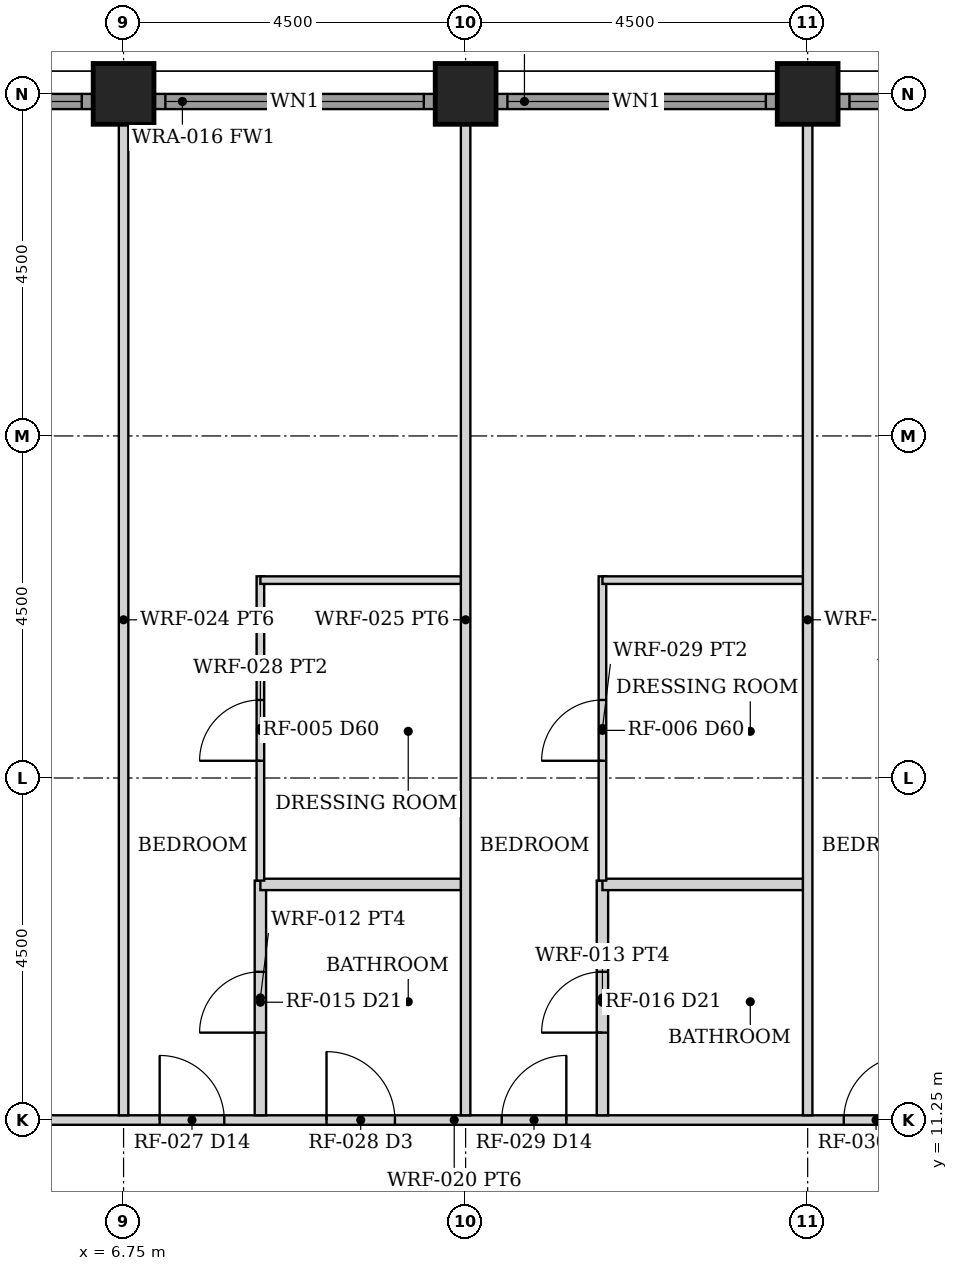
"""IFC4 building model, lengths in metres.
Left out: names, types, materials, properties, quantities, classifications, styles, units other than length and angle.
Written with IfcOpenShell. Run it as: python <this file> out.ifc"""

import sys

from ifc_helpers import new_model, si_unit, direction, frame, frame_2d, origin, origin_2d, place, context, subcontext, project, spatial, rectangle, hollow_rectangle, extrude, element, fill, save


model = new_model("IFC4")
c1 = context("Model", 3, precision=1e-05, world=origin(), true_north=direction((0.0, 1.0)))
c2 = subcontext(c1, "Body", "Model", "MODEL_VIEW")
j1 = project(units=[si_unit("LENGTHUNIT", "METRE"), si_unit("PLANEANGLEUNIT", "RADIAN")], contexts=[c1])
p1 = place(None, origin())
s1 = spatial("IfcSite", under=j1, at=p1, CompositionType="ELEMENT")
p2 = place(p1, origin())
s2 = spatial("IfcBuilding", under=s1, at=p2, CompositionType="ELEMENT")
p3 = place(p2, frame((0.0, 0.0, 79.0)))
s3 = spatial("IfcBuildingStorey", under=s2, at=p3, CompositionType="ELEMENT", Elevation=79.0)
for number, where, z_axis, x_axis in (
    (1, (6.75, 24.75, 0.0), (0.0, 0.0, 1.0), (0.0, 1.0, 0.0)),
    (2, (11.25, 24.75, 0.0), (0.0, 0.0, 1.0), (0.0, 1.0, 0.0)),
    (3, (15.75, 24.75, 0.0), (0.0, 0.0, 1.0), (0.0, 1.0, 0.0)),
):
    element("IfcColumn", number, at=place(p3, frame(where, z_axis=z_axis, x_axis=x_axis)), inside=s3, PredefinedType="COLUMN", context=c2, shape_type="SweptSolid", body=[
        extrude(hollow_rectangle(XDim=0.8, YDim=0.8, WallThickness=0.06, at=origin_2d()), origin(), (0.0, 0.0, 1.0), 3.5),
    ])
p4 = place(p3, frame((2.655, 24.65, 0.0), z_axis=(0.0, 0.0, 1.0), x_axis=(1.0, 0.0, 0.0)))
e4 = element("IfcWall", 4, at=p4, inside=s3, PredefinedType="SOLIDWALL", context=c2, shape_type="SweptSolid", body=[
    extrude(rectangle(XDim=3.69, YDim=0.2, at=frame_2d((1.845, 0.0))), origin(), (0.0, 0.0, 1.0), 2.379),
])
p5 = place(p4, frame((0.145, 0.0, 0.3)))
e5 = element("IfcOpeningElement", 5, at=p5, cuts=e4, PredefinedType="OPENING", context=c2, shape_type="SweptSolid", body=[
    extrude(rectangle(XDim=3.4, YDim=1.929, at=frame_2d((1.7, 0.964))), frame((0.0, 0.11, 0.0), z_axis=(0.0, -1.0, 0.0), x_axis=(1.0, 0.0, 0.0)), (0.0, 0.0, 1.0), 0.22),
])
p6 = place(p3, frame((7.155, 24.65, 0.0), z_axis=(0.0, 0.0, 1.0), x_axis=(1.0, 0.0, 0.0)))
e6 = element("IfcWall", 6, at=p6, inside=s3, PredefinedType="SOLIDWALL", context=c2, shape_type="SweptSolid", body=[
    extrude(rectangle(XDim=3.69, YDim=0.2, at=frame_2d((1.845, 0.0))), origin(), (0.0, 0.0, 1.0), 2.379),
])
p7 = place(p6, frame((0.145, 0.0, 0.3)))
e7 = element("IfcOpeningElement", 7, at=p7, cuts=e6, PredefinedType="OPENING", context=c2, shape_type="SweptSolid", body=[
    extrude(rectangle(XDim=3.4, YDim=1.929, at=frame_2d((1.7, 0.964))), frame((0.0, 0.11, 0.0), z_axis=(0.0, -1.0, 0.0), x_axis=(1.0, 0.0, 0.0)), (0.0, 0.0, 1.0), 0.22),
])
p8 = place(p3, frame((11.655, 24.65, 0.0), z_axis=(0.0, 0.0, 1.0), x_axis=(1.0, 0.0, 0.0)))
e8 = element("IfcWall", 8, at=p8, inside=s3, PredefinedType="SOLIDWALL", context=c2, shape_type="SweptSolid", body=[
    extrude(rectangle(XDim=3.69, YDim=0.2, at=frame_2d((1.845, 0.0))), origin(), (0.0, 0.0, 1.0), 2.379),
])
p9 = place(p8, frame((0.145, 0.0, 0.3)))
e9 = element("IfcOpeningElement", 9, at=p9, cuts=e8, PredefinedType="OPENING", context=c2, shape_type="SweptSolid", body=[
    extrude(rectangle(XDim=3.4, YDim=1.929, at=frame_2d((1.7, 0.964))), frame((0.0, 0.11, 0.0), z_axis=(0.0, -1.0, 0.0), x_axis=(1.0, 0.0, 0.0)), (0.0, 0.0, 1.0), 0.22),
])
p10 = place(p3, frame((16.155, 24.65, 0.0), z_axis=(0.0, 0.0, 1.0), x_axis=(1.0, 0.0, 0.0)))
e10 = element("IfcWall", 10, at=p10, inside=s3, PredefinedType="SOLIDWALL", context=c2, shape_type="SweptSolid", body=[
    extrude(rectangle(XDim=3.69, YDim=0.2, at=frame_2d((1.845, 0.0))), origin(), (0.0, 0.0, 1.0), 2.379),
])
p11 = place(p10, frame((0.145, 0.0, 0.3)))
e11 = element("IfcOpeningElement", 11, at=p11, cuts=e10, PredefinedType="OPENING", context=c2, shape_type="SweptSolid", body=[
    extrude(rectangle(XDim=3.4, YDim=1.929, at=frame_2d((1.7, 0.964))), frame((0.0, 0.11, 0.0), z_axis=(0.0, -1.0, 0.0), x_axis=(1.0, 0.0, 0.0)), (0.0, 0.0, 1.0), 0.22),
])
p12 = place(p3, frame((-2.15, 11.25, 0.0), z_axis=(0.0, 0.0, 1.0), x_axis=(1.0, 0.0, 0.0)))
e12 = element("IfcWall", 12, at=p12, inside=s3, PredefinedType="PARTITIONING", context=c2, shape_type="SweptSolid", body=[
    extrude(rectangle(XDim=26.5, YDim=0.125, at=frame_2d((13.25, 0.0))), origin(), (0.0, 0.0, 1.0), 2.373),
])
p13 = place(p12, frame((0.85, 0.0, 0.0)))
e13 = element("IfcOpeningElement", 13, at=p13, cuts=e12, PredefinedType="OPENING", context=c2, shape_type="SweptSolid", body=[
    extrude(rectangle(XDim=0.9, YDim=2.1, at=frame_2d((0.45, 1.05))), frame((0.0, 0.073, 0.0), z_axis=(0.0, -1.0, 0.0), x_axis=(1.0, 0.0, 0.0)), (0.0, 0.0, 1.0), 0.145),
])
p14 = place(p12, frame((5.95, 0.0, 0.0)))
e14 = element("IfcOpeningElement", 14, at=p14, cuts=e12, PredefinedType="OPENING", context=c2, shape_type="SweptSolid", body=[
    extrude(rectangle(XDim=1.4, YDim=2.1, at=frame_2d((0.7, 1.05))), frame((0.0, 0.073, 0.0), z_axis=(0.0, -1.0, 0.0), x_axis=(1.0, 0.0, 0.0)), (0.0, 0.0, 1.0), 0.145),
])
p15 = place(p12, frame((9.375, 0.0, 0.0)))
e15 = element("IfcOpeningElement", 15, at=p15, cuts=e12, PredefinedType="OPENING", context=c2, shape_type="SweptSolid", body=[
    extrude(rectangle(XDim=0.85, YDim=2.1, at=frame_2d((0.425, 1.05))), frame((0.0, 0.073, 0.0), z_axis=(0.0, -1.0, 0.0), x_axis=(1.0, 0.0, 0.0)), (0.0, 0.0, 1.0), 0.145),
])
p16 = place(p12, frame((11.57, 0.0, 0.0)))
e16 = element("IfcOpeningElement", 16, at=p16, cuts=e12, PredefinedType="OPENING", context=c2, shape_type="SweptSolid", body=[
    extrude(rectangle(XDim=0.9, YDim=2.1, at=frame_2d((0.45, 1.05))), frame((0.0, 0.073, 0.0), z_axis=(0.0, -1.0, 0.0), x_axis=(1.0, 0.0, 0.0)), (0.0, 0.0, 1.0), 0.145),
])
p17 = place(p12, frame((13.875, 0.0, 0.0)))
e17 = element("IfcOpeningElement", 17, at=p17, cuts=e12, PredefinedType="OPENING", context=c2, shape_type="SweptSolid", body=[
    extrude(rectangle(XDim=0.85, YDim=2.1, at=frame_2d((0.425, 1.05))), frame((0.0, 0.073, 0.0), z_axis=(0.0, -1.0, 0.0), x_axis=(1.0, 0.0, 0.0)), (0.0, 0.0, 1.0), 0.145),
])
p18 = place(p12, frame((18.375, 0.0, 0.0)))
e18 = element("IfcOpeningElement", 18, at=p18, cuts=e12, PredefinedType="OPENING", context=c2, shape_type="SweptSolid", body=[
    extrude(rectangle(XDim=0.85, YDim=2.1, at=frame_2d((0.425, 1.05))), frame((0.0, 0.073, 0.0), z_axis=(0.0, -1.0, 0.0), x_axis=(1.0, 0.0, 0.0)), (0.0, 0.0, 1.0), 0.145),
])
p19 = place(p12, frame((22.875, 0.0, 0.0)))
e19 = element("IfcOpeningElement", 19, at=p19, cuts=e12, PredefinedType="OPENING", context=c2, shape_type="SweptSolid", body=[
    extrude(rectangle(XDim=0.85, YDim=2.1, at=frame_2d((0.425, 1.05))), frame((0.0, 0.073, 0.0), z_axis=(0.0, -1.0, 0.0), x_axis=(1.0, 0.0, 0.0)), (0.0, 0.0, 1.0), 0.145),
])
p20 = place(p3, frame((6.75, 11.312, 0.0), z_axis=(0.0, 0.0, 1.0), x_axis=(0.0, 1.0, 0.0)))
e20 = element("IfcWall", 20, at=p20, inside=s3, PredefinedType="PARTITIONING", context=c2, shape_type="SweptSolid", body=[
    extrude(rectangle(XDim=13.038, YDim=0.125, at=frame_2d((6.519, 0.0))), origin(), (0.0, 0.0, 1.0), 2.373),
])
p21 = place(p3, frame((8.55, 11.312, 0.0), z_axis=(0.0, 0.0, 1.0), x_axis=(0.0, 1.0, 0.0)))
e21 = element("IfcWall", 21, at=p21, inside=s3, PredefinedType="PARTITIONING", context=c2, shape_type="SweptSolid", body=[
    extrude(rectangle(XDim=3.087, YDim=0.15, at=frame_2d((1.544, 0.0))), origin(), (0.0, 0.0, 1.0), 2.373),
])
p22 = place(p21, frame((1.087, 0.0, 0.0)))
e22 = element("IfcOpeningElement", 22, at=p22, cuts=e21, PredefinedType="OPENING", context=c2, shape_type="SweptSolid", body=[
    extrude(rectangle(XDim=0.8, YDim=2.1, at=frame_2d((0.4, 1.05))), frame((0.0, 0.085, 0.0), z_axis=(0.0, -1.0, 0.0), x_axis=(1.0, 0.0, 0.0)), (0.0, 0.0, 1.0), 0.17),
])
p23 = place(p3, frame((8.55, 14.35, 0.0), z_axis=(0.0, 0.0, 1.0), x_axis=(1.0, 0.0, 0.0)))
e23 = element("IfcWall", 23, at=p23, inside=s3, PredefinedType="PARTITIONING", context=c2, shape_type="SweptSolid", body=[
    extrude(rectangle(XDim=2.64, YDim=0.15, at=frame_2d((1.32, 0.0))), origin(), (0.0, 0.0, 1.0), 2.373),
])
p24 = place(p3, frame((8.55, 14.4, 0.0), z_axis=(0.0, 0.0, 1.0), x_axis=(0.0, 1.0, 0.0)))
e24 = element("IfcWall", 24, at=p24, inside=s3, PredefinedType="PARTITIONING", context=c2, shape_type="SweptSolid", body=[
    extrude(rectangle(XDim=4.003, YDim=0.1, at=frame_2d((2.001, 0.0))), origin(), (0.0, 0.0, 1.0), 2.373),
])
p25 = place(p24, frame((1.576, 0.0, 0.0)))
e25 = element("IfcOpeningElement", 25, at=p25, cuts=e24, PredefinedType="OPENING", context=c2, shape_type="SweptSolid", body=[
    extrude(rectangle(XDim=0.8, YDim=2.1, at=frame_2d((0.4, 1.05))), frame((0.0, 0.06, 0.0), z_axis=(0.0, -1.0, 0.0), x_axis=(1.0, 0.0, 0.0)), (0.0, 0.0, 1.0), 0.12),
])
p26 = place(p3, frame((8.55, 18.353, 0.0), z_axis=(0.0, 0.0, 1.0), x_axis=(1.0, 0.0, 0.0)))
e26 = element("IfcWall", 26, at=p26, inside=s3, PredefinedType="PARTITIONING", context=c2, shape_type="SweptSolid", body=[
    extrude(rectangle(XDim=2.64, YDim=0.1, at=frame_2d((1.32, 0.0))), origin(), (0.0, 0.0, 1.0), 2.373),
])
p27 = place(p3, frame((11.25, 11.312, 0.0), z_axis=(0.0, 0.0, 1.0), x_axis=(0.0, 1.0, 0.0)))
e27 = element("IfcWall", 27, at=p27, inside=s3, PredefinedType="PARTITIONING", context=c2, shape_type="SweptSolid", body=[
    extrude(rectangle(XDim=13.038, YDim=0.125, at=frame_2d((6.519, 0.0))), origin(), (0.0, 0.0, 1.0), 2.373),
])
p28 = place(p3, frame((13.05, 11.312, 0.0), z_axis=(0.0, 0.0, 1.0), x_axis=(0.0, 1.0, 0.0)))
e28 = element("IfcWall", 28, at=p28, inside=s3, PredefinedType="PARTITIONING", context=c2, shape_type="SweptSolid", body=[
    extrude(rectangle(XDim=3.087, YDim=0.15, at=frame_2d((1.544, 0.0))), origin(), (0.0, 0.0, 1.0), 2.373),
])
p29 = place(p28, frame((1.087, 0.0, 0.0)))
e29 = element("IfcOpeningElement", 29, at=p29, cuts=e28, PredefinedType="OPENING", context=c2, shape_type="SweptSolid", body=[
    extrude(rectangle(XDim=0.8, YDim=2.1, at=frame_2d((0.4, 1.05))), frame((0.0, 0.085, 0.0), z_axis=(0.0, -1.0, 0.0), x_axis=(1.0, 0.0, 0.0)), (0.0, 0.0, 1.0), 0.17),
])
p30 = place(p3, frame((13.05, 14.35, 0.0), z_axis=(0.0, 0.0, 1.0), x_axis=(1.0, 0.0, 0.0)))
e30 = element("IfcWall", 30, at=p30, inside=s3, PredefinedType="PARTITIONING", context=c2, shape_type="SweptSolid", body=[
    extrude(rectangle(XDim=2.64, YDim=0.15, at=frame_2d((1.32, 0.0))), origin(), (0.0, 0.0, 1.0), 2.373),
])
p31 = place(p3, frame((13.05, 14.4, 0.0), z_axis=(0.0, 0.0, 1.0), x_axis=(0.0, 1.0, 0.0)))
e31 = element("IfcWall", 31, at=p31, inside=s3, PredefinedType="PARTITIONING", context=c2, shape_type="SweptSolid", body=[
    extrude(rectangle(XDim=4.003, YDim=0.1, at=frame_2d((2.001, 0.0))), origin(), (0.0, 0.0, 1.0), 2.373),
])
p32 = place(p31, frame((1.576, 0.0, 0.0)))
e32 = element("IfcOpeningElement", 32, at=p32, cuts=e31, PredefinedType="OPENING", context=c2, shape_type="SweptSolid", body=[
    extrude(rectangle(XDim=0.8, YDim=2.1, at=frame_2d((0.4, 1.05))), frame((0.0, 0.06, 0.0), z_axis=(0.0, -1.0, 0.0), x_axis=(1.0, 0.0, 0.0)), (0.0, 0.0, 1.0), 0.12),
])
p33 = place(p3, frame((13.05, 18.353, 0.0), z_axis=(0.0, 0.0, 1.0), x_axis=(1.0, 0.0, 0.0)))
e33 = element("IfcWall", 33, at=p33, inside=s3, PredefinedType="PARTITIONING", context=c2, shape_type="SweptSolid", body=[
    extrude(rectangle(XDim=2.64, YDim=0.1, at=frame_2d((1.32, 0.0))), origin(), (0.0, 0.0, 1.0), 2.373),
])
p34 = place(p3, frame((15.75, 11.312, 0.0), z_axis=(0.0, 0.0, 1.0), x_axis=(0.0, 1.0, 0.0)))
e34 = element("IfcWall", 34, at=p34, inside=s3, PredefinedType="PARTITIONING", context=c2, shape_type="SweptSolid", body=[
    extrude(rectangle(XDim=13.038, YDim=0.125, at=frame_2d((6.519, 0.0))), origin(), (0.0, 0.0, 1.0), 2.373),
])
p35 = place(p5, origin())
e35 = element("IfcWindow", 35, at=p35, inside=s3, PartitioningType="SINGLE_PANEL", PredefinedType="WINDOW", context=c2, shape_type="SweptSolid", body=[
    extrude(rectangle(XDim=3.4, YDim=1.929, at=frame_2d((1.7, 0.964))), frame((0.0, 0.03, 0.0), z_axis=(0.0, -1.0, 0.0), x_axis=(1.0, 0.0, 0.0)), (0.0, 0.0, 1.0), 0.06),
])
fill(e5, e35)
p36 = place(p7, origin())
e36 = element("IfcWindow", 36, at=p36, inside=s3, PartitioningType="SINGLE_PANEL", PredefinedType="WINDOW", context=c2, shape_type="SweptSolid", body=[
    extrude(rectangle(XDim=3.4, YDim=1.929, at=frame_2d((1.7, 0.964))), frame((0.0, 0.03, 0.0), z_axis=(0.0, -1.0, 0.0), x_axis=(1.0, 0.0, 0.0)), (0.0, 0.0, 1.0), 0.06),
])
fill(e7, e36)
p37 = place(p9, origin())
e37 = element("IfcWindow", 37, at=p37, inside=s3, PartitioningType="SINGLE_PANEL", PredefinedType="WINDOW", context=c2, shape_type="SweptSolid", body=[
    extrude(rectangle(XDim=3.4, YDim=1.929, at=frame_2d((1.7, 0.964))), frame((0.0, 0.03, 0.0), z_axis=(0.0, -1.0, 0.0), x_axis=(1.0, 0.0, 0.0)), (0.0, 0.0, 1.0), 0.06),
])
fill(e9, e37)
p38 = place(p11, origin())
e38 = element("IfcWindow", 38, at=p38, inside=s3, PartitioningType="SINGLE_PANEL", PredefinedType="WINDOW", context=c2, shape_type="SweptSolid", body=[
    extrude(rectangle(XDim=3.4, YDim=1.929, at=frame_2d((1.7, 0.964))), frame((0.0, 0.03, 0.0), z_axis=(0.0, -1.0, 0.0), x_axis=(1.0, 0.0, 0.0)), (0.0, 0.0, 1.0), 0.06),
])
fill(e11, e38)
p39 = place(p15, origin())
e39 = element("IfcDoor", 39, at=p39, inside=s3, OperationType="SINGLE_SWING_LEFT", PredefinedType="DOOR", context=c2, shape_type="SweptSolid", body=[
    extrude(rectangle(XDim=0.85, YDim=2.1, at=frame_2d((0.425, 1.05))), frame((0.0, 0.025, 0.0), z_axis=(0.0, -1.0, 0.0), x_axis=(1.0, 0.0, 0.0)), (0.0, 0.0, 1.0), 0.05),
])
fill(e15, e39)
p40 = place(p22, origin())
e40 = element("IfcDoor", 40, at=p40, inside=s3, OperationType="SINGLE_SWING_LEFT", PredefinedType="DOOR", context=c2, shape_type="SweptSolid", body=[
    extrude(rectangle(XDim=0.8, YDim=2.1, at=frame_2d((0.4, 1.05))), frame((0.0, 0.025, 0.0), z_axis=(0.0, -1.0, 0.0), x_axis=(1.0, 0.0, 0.0)), (0.0, 0.0, 1.0), 0.05),
])
fill(e22, e40)
p41 = place(p16, origin())
e41 = element("IfcDoor", 41, at=p41, inside=s3, OperationType="SINGLE_SWING_LEFT", PredefinedType="DOOR", context=c2, shape_type="SweptSolid", body=[
    extrude(rectangle(XDim=0.9, YDim=2.1, at=frame_2d((0.45, 1.05))), frame((0.0, 0.025, 0.0), z_axis=(0.0, -1.0, 0.0), x_axis=(1.0, 0.0, 0.0)), (0.0, 0.0, 1.0), 0.05),
])
fill(e16, e41)
p42 = place(p25, origin())
e42 = element("IfcDoor", 42, at=p42, inside=s3, OperationType="SINGLE_SWING_LEFT", PredefinedType="DOOR", context=c2, shape_type="SweptSolid", body=[
    extrude(rectangle(XDim=0.8, YDim=2.1, at=frame_2d((0.4, 1.05))), frame((0.0, 0.025, 0.0), z_axis=(0.0, -1.0, 0.0), x_axis=(1.0, 0.0, 0.0)), (0.0, 0.0, 1.0), 0.05),
])
fill(e25, e42)
p43 = place(p17, origin())
e43 = element("IfcDoor", 43, at=p43, inside=s3, OperationType="SINGLE_SWING_RIGHT", PredefinedType="DOOR", context=c2, shape_type="SweptSolid", body=[
    extrude(rectangle(XDim=0.85, YDim=2.1, at=frame_2d((0.425, 1.05))), frame((0.0, 0.025, 0.0), z_axis=(0.0, -1.0, 0.0), x_axis=(1.0, 0.0, 0.0)), (0.0, 0.0, 1.0), 0.05),
])
fill(e17, e43)
p44 = place(p29, origin())
e44 = element("IfcDoor", 44, at=p44, inside=s3, OperationType="SINGLE_SWING_LEFT", PredefinedType="DOOR", context=c2, shape_type="SweptSolid", body=[
    extrude(rectangle(XDim=0.8, YDim=2.1, at=frame_2d((0.4, 1.05))), frame((0.0, 0.025, 0.0), z_axis=(0.0, -1.0, 0.0), x_axis=(1.0, 0.0, 0.0)), (0.0, 0.0, 1.0), 0.05),
])
fill(e29, e44)
p45 = place(p32, origin())
e45 = element("IfcDoor", 45, at=p45, inside=s3, OperationType="SINGLE_SWING_LEFT", PredefinedType="DOOR", context=c2, shape_type="SweptSolid", body=[
    extrude(rectangle(XDim=0.8, YDim=2.1, at=frame_2d((0.4, 1.05))), frame((0.0, 0.025, 0.0), z_axis=(0.0, -1.0, 0.0), x_axis=(1.0, 0.0, 0.0)), (0.0, 0.0, 1.0), 0.05),
])
fill(e32, e45)
p46 = place(p18, origin())
e46 = element("IfcDoor", 46, at=p46, inside=s3, OperationType="SINGLE_SWING_RIGHT", PredefinedType="DOOR", context=c2, shape_type="SweptSolid", body=[
    extrude(rectangle(XDim=0.85, YDim=2.1, at=frame_2d((0.425, 1.05))), frame((0.0, 0.025, 0.0), z_axis=(0.0, -1.0, 0.0), x_axis=(1.0, 0.0, 0.0)), (0.0, 0.0, 1.0), 0.05),
])
fill(e18, e46)
save(model, sys.argv[1])
